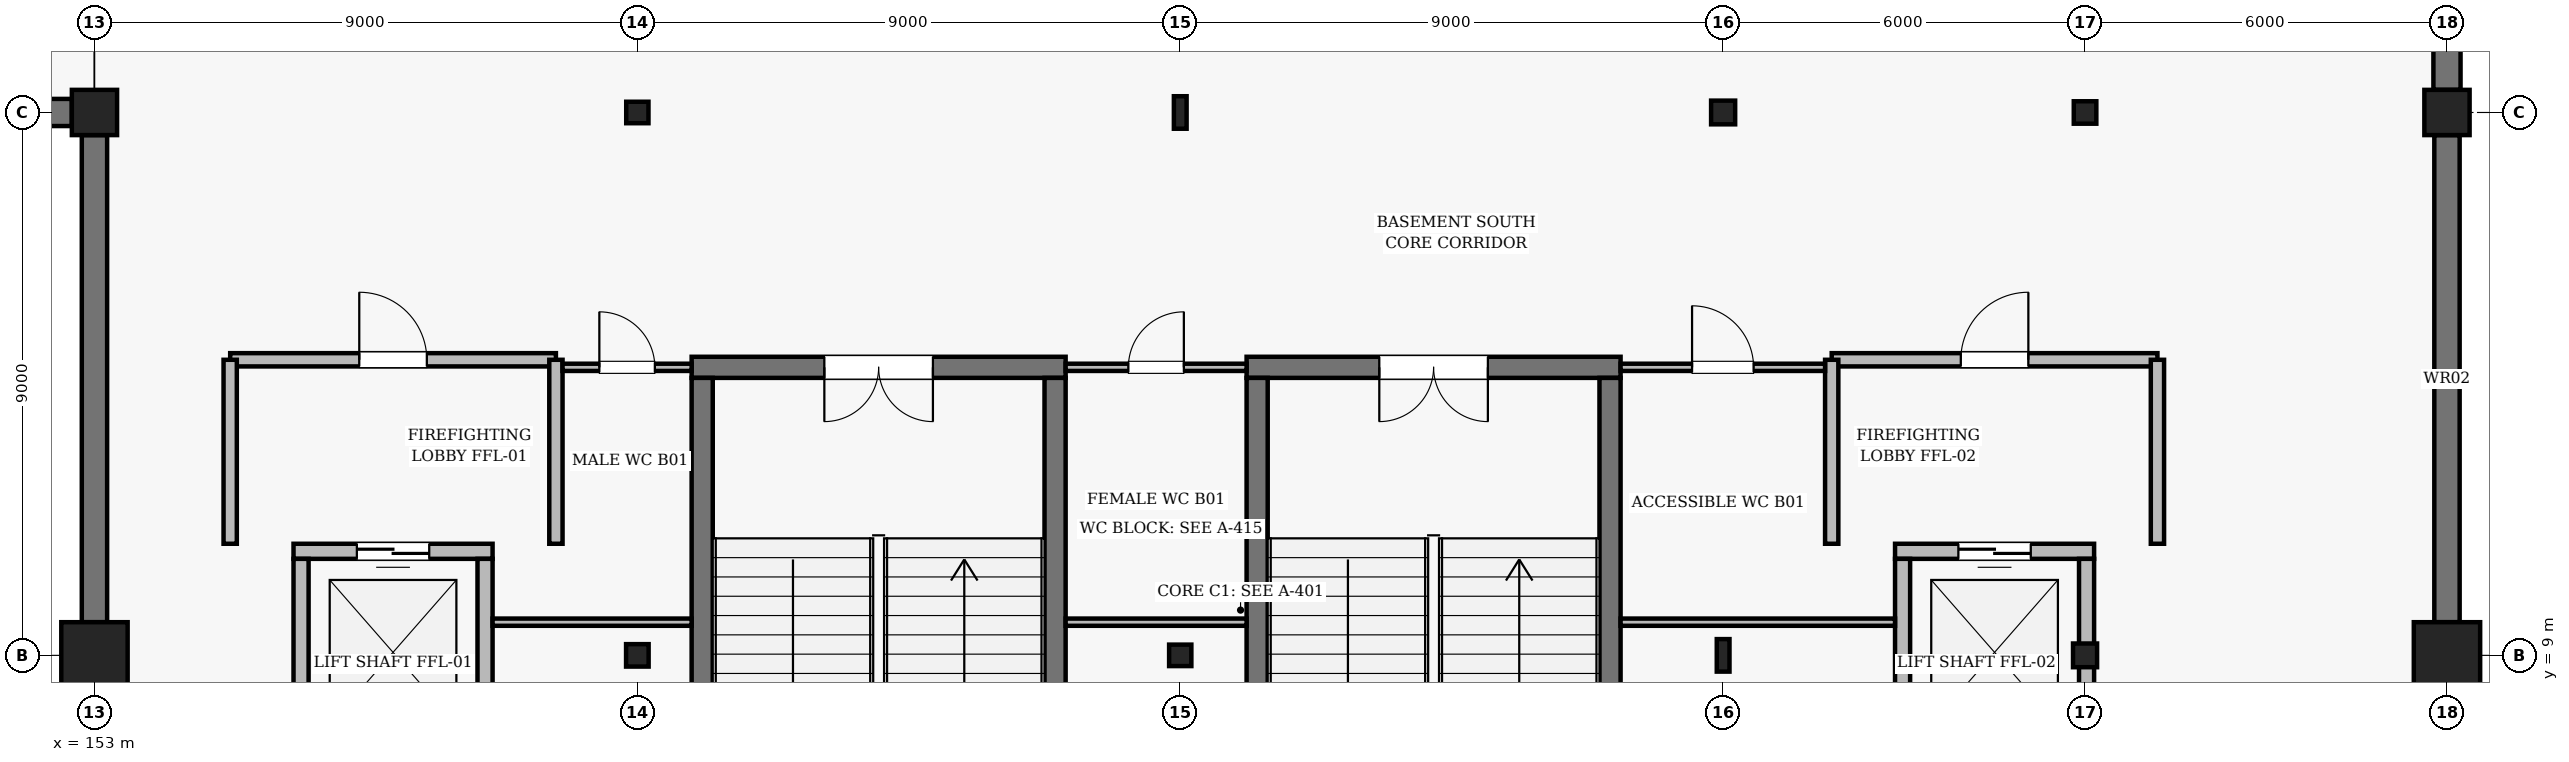
"""IFC4 building model, lengths in metres.
Left out: names, types, materials, properties, quantities, classifications, styles, units other than length and angle.
Written with IfcOpenShell. Run it as: python <this file> out.ifc"""

import sys

from ifc_helpers import new_model, si_unit, direction, frame, frame_2d, origin, origin_2d, place, context, subcontext, project, spatial, rectangle, i_section, extrude, element, fill, save


model = new_model("IFC4")
c1 = context("Model", 3, precision=1e-05, world=origin(), true_north=direction((0.0, 1.0)))
c2 = subcontext(c1, "Body", "Model", "MODEL_VIEW")
j1 = project(units=[si_unit("LENGTHUNIT", "METRE"), si_unit("PLANEANGLEUNIT", "RADIAN")], contexts=[c1])
p1 = place(None, origin())
s1 = spatial("IfcSite", under=j1, at=p1, CompositionType="ELEMENT")
p2 = place(p1, origin())
s2 = spatial("IfcBuilding", under=s1, at=p2, CompositionType="ELEMENT")
p3 = place(p2, frame((0.0, 0.0, -5.4)))
s3 = spatial("IfcBuildingStorey", under=s2, at=p3, CompositionType="ELEMENT", Elevation=-5.4)
p4 = place(p3, frame((153.0, 9.0, 0.0), z_axis=(0.0, 0.0, 1.0), x_axis=(1.0, 0.0, 0.0)))
e1 = element("IfcColumn", 1, at=p4, inside=s3, PredefinedType="COLUMN", context=c2, shape_type="SweptSolid", body=[
    extrude(rectangle(XDim=1.1, YDim=1.1, at=origin_2d()), origin(), (0.0, 0.0, 1.0), 5.4),
])
p5 = place(p3, frame((153.0, 18.0, 0.0), z_axis=(0.0, 0.0, 1.0), x_axis=(1.0, 0.0, 0.0)))
e2 = element("IfcColumn", 2, at=p5, inside=s3, PredefinedType="COLUMN", context=c2, shape_type="SweptSolid", body=[
    extrude(rectangle(XDim=0.75, YDim=0.75, at=origin_2d()), origin(), (0.0, 0.0, 1.0), 5.4),
])
p6 = place(p3, frame((162.0, 9.0, 0.0), z_axis=(0.0, 0.0, 1.0), x_axis=(1.0, 0.0, 0.0)))
e3 = element("IfcColumn", 3, at=p6, inside=s3, PredefinedType="COLUMN", context=c2, shape_type="SweptSolid", body=[
    extrude(i_section(OverallWidth=0.374, OverallDepth=0.372, WebThickness=0.016, FlangeThickness=0.026, FilletRadius=0.016, at=origin_2d()), origin(), (0.0, 0.0, 1.0), 5.4),
])
for number, where, z_axis, x_axis in (
    (4, (162.0, 18.0, 0.0), (0.0, 0.0, 1.0), (1.0, 0.0, 0.0)),
    (5, (171.0, 9.0, 0.0), (0.0, 0.0, 1.0), (1.0, 0.0, 0.0)),
):
    element("IfcColumn", number, at=place(p3, frame(where, z_axis=z_axis, x_axis=x_axis)), inside=s3, PredefinedType="COLUMN", context=c2, shape_type="SweptSolid", body=[
        extrude(i_section(OverallWidth=0.369, OverallDepth=0.356, WebThickness=0.011, FlangeThickness=0.018, FilletRadius=0.015, at=origin_2d()), origin(), (0.0, 0.0, 1.0), 5.4),
    ])
for number, where, z_axis, x_axis in (
    (6, (171.0, 18.0, 0.0), (0.0, 0.0, 1.0), (1.0, 0.0, 0.0)),
    (7, (180.0, 9.0, 0.0), (0.0, 0.0, 1.0), (1.0, 0.0, 0.0)),
):
    element("IfcColumn", number, at=place(p3, frame(where, z_axis=z_axis, x_axis=x_axis)), inside=s3, PredefinedType="COLUMN", context=c2, shape_type="SweptSolid", body=[
        extrude(i_section(OverallWidth=0.211, OverallDepth=0.539, WebThickness=0.012, FlangeThickness=0.019, FilletRadius=0.014, at=origin_2d()), origin(), (0.0, 0.0, 1.0), 5.4),
    ])
for number, where, z_axis, x_axis in (
    (8, (180.0, 18.0, 0.0), (0.0, 0.0, 1.0), (1.0, 0.0, 0.0)),
    (9, (186.0, 9.0, 0.0), (0.0, 0.0, 1.0), (1.0, 0.0, 0.0)),
):
    element("IfcColumn", number, at=place(p3, frame(where, z_axis=z_axis, x_axis=x_axis)), inside=s3, PredefinedType="COLUMN", context=c2, shape_type="SweptSolid", body=[
        extrude(i_section(OverallWidth=0.399, OverallDepth=0.393, WebThickness=0.023, FlangeThickness=0.037, FilletRadius=0.018, at=origin_2d()), origin(), (0.0, 0.0, 1.0), 5.4),
    ])
p7 = place(p3, frame((186.0, 18.0, 0.0), z_axis=(0.0, 0.0, 1.0), x_axis=(1.0, 0.0, 0.0)))
e10 = element("IfcColumn", 10, at=p7, inside=s3, PredefinedType="COLUMN", context=c2, shape_type="SweptSolid", body=[
    extrude(i_section(OverallWidth=0.374, OverallDepth=0.372, WebThickness=0.016, FlangeThickness=0.026, FilletRadius=0.016, at=origin_2d()), origin(), (0.0, 0.0, 1.0), 5.4),
])
p8 = place(p3, frame((192.0, 9.0, 0.0), z_axis=(0.0, 0.0, 1.0), x_axis=(1.0, 0.0, 0.0)))
e11 = element("IfcColumn", 11, at=p8, inside=s3, PredefinedType="COLUMN", context=c2, shape_type="SweptSolid", body=[
    extrude(rectangle(XDim=1.1, YDim=1.1, at=origin_2d()), origin(), (0.0, 0.0, 1.0), 5.4),
])
p9 = place(p3, frame((192.0, 18.0, 0.0), z_axis=(0.0, 0.0, 1.0), x_axis=(1.0, 0.0, 0.0)))
e12 = element("IfcColumn", 12, at=p9, inside=s3, PredefinedType="COLUMN", context=c2, shape_type="SweptSolid", body=[
    extrude(rectangle(XDim=0.75, YDim=0.75, at=origin_2d()), origin(), (0.0, 0.0, 1.0), 5.4),
])
p10 = place(p3, frame((192.0, 26.625, 0.0), z_axis=(0.0, 0.0, 1.0), x_axis=(0.0, -1.0, 0.0)))
e13 = element("IfcWall", 13, at=p10, inside=s3, PredefinedType="USERDEFINED", context=c2, shape_type="SweptSolid", body=[
    extrude(rectangle(XDim=8.25, YDim=0.45, at=frame_2d((4.125, 0.0))), origin(), (0.0, 0.0, 1.0), 4.805),
])
p11 = place(p3, frame((192.0, 17.625, 0.0), z_axis=(0.0, 0.0, 1.0), x_axis=(0.0, -1.0, 0.0)))
e14 = element("IfcWall", 14, at=p11, inside=s3, PredefinedType="USERDEFINED", context=c2, shape_type="SweptSolid", body=[
    extrude(rectangle(XDim=8.075, YDim=0.42, at=frame_2d((4.038, 0.0))), origin(), (0.0, 0.0, 1.0), 4.639),
])
p12 = place(p3, frame((153.0, 9.55, 0.0), z_axis=(0.0, 0.0, 1.0), x_axis=(0.0, 1.0, 0.0)))
e15 = element("IfcWall", 15, at=p12, inside=s3, PredefinedType="USERDEFINED", context=c2, shape_type="SweptSolid", body=[
    extrude(rectangle(XDim=8.075, YDim=0.42, at=frame_2d((4.038, 0.0))), origin(), (0.0, 0.0, 1.0), 4.421),
])
p13 = place(p3, frame((152.625, 18.0, 0.0), z_axis=(0.0, 0.0, 1.0), x_axis=(-1.0, 0.0, 0.0)))
e16 = element("IfcWall", 16, at=p13, inside=s3, PredefinedType="USERDEFINED", context=c2, shape_type="SweptSolid", body=[
    extrude(rectangle(XDim=8.25, YDim=0.45, at=frame_2d((4.125, 0.0))), origin(), (0.0, 0.0, 1.0), 5.05),
])
p14 = place(p3, frame((169.1, 13.775, 0.0), z_axis=(0.0, 0.0, 1.0), x_axis=(-1.0, 0.0, 0.0)))
e17 = element("IfcWall", 17, at=p14, inside=s3, PredefinedType="SHEAR", context=c2, shape_type="SweptSolid", body=[
    extrude(rectangle(XDim=6.2, YDim=0.35, at=frame_2d((3.1, 0.0))), origin(), (0.0, 0.0, 1.0), 5.12),
])
p15 = place(p14, frame((2.2, 0.0, 0.0)))
e18 = element("IfcOpeningElement", 18, at=p15, cuts=e17, PredefinedType="OPENING", context=c2, shape_type="SweptSolid", body=[
    extrude(rectangle(XDim=1.8, YDim=2.2, at=frame_2d((0.9, 1.1))), frame((0.0, 0.185, 0.0), z_axis=(0.0, -1.0, 0.0), x_axis=(1.0, 0.0, 0.0)), (0.0, 0.0, 1.0), 0.37),
])
for number, where, z_axis, x_axis in (
    (19, (163.075, 13.6, 0.0), (0.0, 0.0, 1.0), (0.0, -1.0, 0.0)),
    (20, (168.925, 2.2, 0.0), (0.0, 0.0, 1.0), (0.0, 1.0, 0.0)),
):
    element("IfcWall", number, at=place(p3, frame(where, z_axis=z_axis, x_axis=x_axis)), inside=s3, PredefinedType="SHEAR", context=c2, shape_type="SweptSolid", body=[
        extrude(rectangle(XDim=11.4, YDim=0.35, at=frame_2d((5.7, 0.0))), origin(), (0.0, 0.0, 1.0), 5.12),
    ])
p16 = place(p3, frame((178.3, 13.775, 0.0), z_axis=(0.0, 0.0, 1.0), x_axis=(-1.0, 0.0, 0.0)))
e21 = element("IfcWall", 21, at=p16, inside=s3, PredefinedType="SHEAR", context=c2, shape_type="SweptSolid", body=[
    extrude(rectangle(XDim=6.2, YDim=0.35, at=frame_2d((3.1, 0.0))), origin(), (0.0, 0.0, 1.0), 5.12),
])
p17 = place(p16, frame((2.2, 0.0, 0.0)))
e22 = element("IfcOpeningElement", 22, at=p17, cuts=e21, PredefinedType="OPENING", context=c2, shape_type="SweptSolid", body=[
    extrude(rectangle(XDim=1.8, YDim=2.2, at=frame_2d((0.9, 1.1))), frame((0.0, 0.185, 0.0), z_axis=(0.0, -1.0, 0.0), x_axis=(1.0, 0.0, 0.0)), (0.0, 0.0, 1.0), 0.37),
])
for number, where, z_axis, x_axis in (
    (23, (172.275, 13.6, 0.0), (0.0, 0.0, 1.0), (0.0, -1.0, 0.0)),
    (24, (178.125, 2.2, 0.0), (0.0, 0.0, 1.0), (0.0, 1.0, 0.0)),
):
    element("IfcWall", number, at=place(p3, frame(where, z_axis=z_axis, x_axis=x_axis)), inside=s3, PredefinedType="SHEAR", context=c2, shape_type="SweptSolid", body=[
        extrude(rectangle(XDim=11.4, YDim=0.35, at=frame_2d((5.7, 0.0))), origin(), (0.0, 0.0, 1.0), 5.12),
    ])
p18 = place(p3, frame((159.6, 10.725, 0.0), z_axis=(0.0, 0.0, 1.0), x_axis=(-1.0, 0.0, 0.0)))
e25 = element("IfcWall", 25, at=p18, inside=s3, PredefinedType="SOLIDWALL", context=c2, shape_type="SweptSolid", body=[
    extrude(rectangle(XDim=3.3, YDim=0.25, at=frame_2d((1.65, 0.0))), origin(), (0.0, 0.0, 1.0), 5.1),
])
p19 = place(p18, frame((1.05, 0.0, 0.0)))
e26 = element("IfcOpeningElement", 26, at=p19, cuts=e25, PredefinedType="OPENING", context=c2, shape_type="SweptSolid", body=[
    extrude(rectangle(XDim=1.2, YDim=2.25, at=frame_2d((0.6, 1.125))), frame((0.0, 0.135, 0.0), z_axis=(0.0, -1.0, 0.0), x_axis=(1.0, 0.0, 0.0)), (0.0, 0.0, 1.0), 0.27),
])
for number, where, z_axis, x_axis in (
    (27, (156.425, 10.6, 0.0), (0.0, 0.0, 1.0), (0.0, -1.0, 0.0)),
    (28, (159.475, 7.5, 0.0), (0.0, 0.0, 1.0), (0.0, 1.0, 0.0)),
):
    element("IfcWall", number, at=place(p3, frame(where, z_axis=z_axis, x_axis=x_axis)), inside=s3, PredefinedType="SOLIDWALL", context=c2, shape_type="SweptSolid", body=[
        extrude(rectangle(XDim=3.1, YDim=0.25, at=frame_2d((1.55, 0.0))), origin(), (0.0, 0.0, 1.0), 5.1),
    ])
p20 = place(p3, frame((155.25, 13.9, 0.0), z_axis=(0.0, 0.0, 1.0), x_axis=(1.0, 0.0, 0.0)))
e29 = element("IfcWall", 29, at=p20, inside=s3, PredefinedType="SOLIDWALL", context=c2, shape_type="SweptSolid", body=[
    extrude(rectangle(XDim=5.4, YDim=0.22, at=frame_2d((2.7, 0.0))), origin(), (0.0, 0.0, 1.0), 5.1),
])
p21 = place(p20, frame((2.14, 0.0, 0.0)))
e30 = element("IfcOpeningElement", 30, at=p21, cuts=e29, PredefinedType="OPENING", context=c2, shape_type="SweptSolid", body=[
    extrude(rectangle(XDim=1.12, YDim=2.2, at=frame_2d((0.56, 1.1))), frame((0.0, 0.12, 0.0), z_axis=(0.0, -1.0, 0.0), x_axis=(1.0, 0.0, 0.0)), (0.0, 0.0, 1.0), 0.24),
])
for number, where, z_axis, x_axis in (
    (31, (155.25, 10.85, 0.0), (0.0, 0.0, 1.0), (0.0, 1.0, 0.0)),
    (32, (160.65, 10.85, 0.0), (0.0, 0.0, 1.0), (0.0, 1.0, 0.0)),
):
    element("IfcWall", number, at=place(p3, frame(where, z_axis=z_axis, x_axis=x_axis)), inside=s3, PredefinedType="SOLIDWALL", context=c2, shape_type="SweptSolid", body=[
        extrude(rectangle(XDim=3.05, YDim=0.22, at=frame_2d((1.525, 0.0))), origin(), (0.0, 0.0, 1.0), 5.1),
    ])
p22 = place(p3, frame((186.15, 10.725, 0.0), z_axis=(0.0, 0.0, 1.0), x_axis=(-1.0, 0.0, 0.0)))
e33 = element("IfcWall", 33, at=p22, inside=s3, PredefinedType="SOLIDWALL", context=c2, shape_type="SweptSolid", body=[
    extrude(rectangle(XDim=3.3, YDim=0.25, at=frame_2d((1.65, 0.0))), origin(), (0.0, 0.0, 1.0), 5.1),
])
p23 = place(p22, frame((1.05, 0.0, 0.0)))
e34 = element("IfcOpeningElement", 34, at=p23, cuts=e33, PredefinedType="OPENING", context=c2, shape_type="SweptSolid", body=[
    extrude(rectangle(XDim=1.2, YDim=2.25, at=frame_2d((0.6, 1.125))), frame((0.0, 0.135, 0.0), z_axis=(0.0, -1.0, 0.0), x_axis=(1.0, 0.0, 0.0)), (0.0, 0.0, 1.0), 0.27),
])
for number, where, z_axis, x_axis in (
    (35, (182.975, 10.6, 0.0), (0.0, 0.0, 1.0), (0.0, -1.0, 0.0)),
    (36, (186.025, 7.5, 0.0), (0.0, 0.0, 1.0), (0.0, 1.0, 0.0)),
):
    element("IfcWall", number, at=place(p3, frame(where, z_axis=z_axis, x_axis=x_axis)), inside=s3, PredefinedType="SOLIDWALL", context=c2, shape_type="SweptSolid", body=[
        extrude(rectangle(XDim=3.1, YDim=0.25, at=frame_2d((1.55, 0.0))), origin(), (0.0, 0.0, 1.0), 5.1),
    ])
p24 = place(p3, frame((181.8, 13.9, 0.0), z_axis=(0.0, 0.0, 1.0), x_axis=(1.0, 0.0, 0.0)))
e37 = element("IfcWall", 37, at=p24, inside=s3, PredefinedType="SOLIDWALL", context=c2, shape_type="SweptSolid", body=[
    extrude(rectangle(XDim=5.4, YDim=0.22, at=frame_2d((2.7, 0.0))), origin(), (0.0, 0.0, 1.0), 5.1),
])
p25 = place(p24, frame((2.14, 0.0, 0.0)))
e38 = element("IfcOpeningElement", 38, at=p25, cuts=e37, PredefinedType="OPENING", context=c2, shape_type="SweptSolid", body=[
    extrude(rectangle(XDim=1.12, YDim=2.2, at=frame_2d((0.56, 1.1))), frame((0.0, 0.12, 0.0), z_axis=(0.0, -1.0, 0.0), x_axis=(1.0, 0.0, 0.0)), (0.0, 0.0, 1.0), 0.24),
])
for number, where, z_axis, x_axis in (
    (39, (181.8, 10.85, 0.0), (0.0, 0.0, 1.0), (0.0, 1.0, 0.0)),
    (40, (187.2, 10.85, 0.0), (0.0, 0.0, 1.0), (0.0, 1.0, 0.0)),
):
    element("IfcWall", number, at=place(p3, frame(where, z_axis=z_axis, x_axis=x_axis)), inside=s3, PredefinedType="SOLIDWALL", context=c2, shape_type="SweptSolid", body=[
        extrude(rectangle(XDim=3.05, YDim=0.22, at=frame_2d((1.525, 0.0))), origin(), (0.0, 0.0, 1.0), 5.1),
    ])
p26 = place(p3, frame((160.76, 13.775, 0.0), z_axis=(0.0, 0.0, 1.0), x_axis=(1.0, 0.0, 0.0)))
e41 = element("IfcWall", 41, at=p26, inside=s3, PredefinedType="PARTITIONING", context=c2, shape_type="SweptSolid", body=[
    extrude(rectangle(XDim=2.14, YDim=0.12, at=frame_2d((1.07, 0.0))), origin(), (0.0, 0.0, 1.0), 4.332),
])
p27 = place(p26, frame((0.61, 0.0, 0.0)))
e42 = element("IfcOpeningElement", 42, at=p27, cuts=e41, PredefinedType="OPENING", context=c2, shape_type="SweptSolid", body=[
    extrude(rectangle(XDim=0.92, YDim=2.12, at=frame_2d((0.46, 1.06))), frame((0.0, 0.07, 0.0), z_axis=(0.0, -1.0, 0.0), x_axis=(1.0, 0.0, 0.0)), (0.0, 0.0, 1.0), 0.14),
])
p28 = place(p3, frame((162.9, 9.55, 0.0), z_axis=(0.0, 0.0, 1.0), x_axis=(-1.0, 0.0, 0.0)))
e43 = element("IfcWall", 43, at=p28, inside=s3, PredefinedType="PARTITIONING", context=c2, shape_type="SweptSolid", body=[
    extrude(rectangle(XDim=3.3, YDim=0.12, at=frame_2d((1.65, 0.0))), origin(), (0.0, 0.0, 1.0), 4.332),
])
p29 = place(p3, frame((169.1, 13.775, 0.0), z_axis=(0.0, 0.0, 1.0), x_axis=(1.0, 0.0, 0.0)))
e44 = element("IfcWall", 44, at=p29, inside=s3, PredefinedType="PARTITIONING", context=c2, shape_type="SweptSolid", body=[
    extrude(rectangle(XDim=3.0, YDim=0.12, at=frame_2d((1.5, 0.0))), origin(), (0.0, 0.0, 1.0), 4.332),
])
p30 = place(p29, frame((1.04, 0.0, 0.0)))
e45 = element("IfcOpeningElement", 45, at=p30, cuts=e44, PredefinedType="OPENING", context=c2, shape_type="SweptSolid", body=[
    extrude(rectangle(XDim=0.92, YDim=2.12, at=frame_2d((0.46, 1.06))), frame((0.0, 0.07, 0.0), z_axis=(0.0, -1.0, 0.0), x_axis=(1.0, 0.0, 0.0)), (0.0, 0.0, 1.0), 0.14),
])
p31 = place(p3, frame((172.1, 9.55, 0.0), z_axis=(0.0, 0.0, 1.0), x_axis=(-1.0, 0.0, 0.0)))
e46 = element("IfcWall", 46, at=p31, inside=s3, PredefinedType="PARTITIONING", context=c2, shape_type="SweptSolid", body=[
    extrude(rectangle(XDim=3.0, YDim=0.12, at=frame_2d((1.5, 0.0))), origin(), (0.0, 0.0, 1.0), 4.332),
])
p32 = place(p3, frame((178.3, 13.775, 0.0), z_axis=(0.0, 0.0, 1.0), x_axis=(1.0, 0.0, 0.0)))
e47 = element("IfcWall", 47, at=p32, inside=s3, PredefinedType="PARTITIONING", context=c2, shape_type="SweptSolid", body=[
    extrude(rectangle(XDim=3.39, YDim=0.12, at=frame_2d((1.695, 0.0))), origin(), (0.0, 0.0, 1.0), 4.332),
])
p33 = place(p32, frame((1.185, 0.0, 0.0)))
e48 = element("IfcOpeningElement", 48, at=p33, cuts=e47, PredefinedType="OPENING", context=c2, shape_type="SweptSolid", body=[
    extrude(rectangle(XDim=1.02, YDim=2.16, at=frame_2d((0.51, 1.08))), frame((0.0, 0.07, 0.0), z_axis=(0.0, -1.0, 0.0), x_axis=(1.0, 0.0, 0.0)), (0.0, 0.0, 1.0), 0.14),
])
p34 = place(p3, frame((182.85, 9.55, 0.0), z_axis=(0.0, 0.0, 1.0), x_axis=(-1.0, 0.0, 0.0)))
e49 = element("IfcWall", 49, at=p34, inside=s3, PredefinedType="PARTITIONING", context=c2, shape_type="SweptSolid", body=[
    extrude(rectangle(XDim=4.55, YDim=0.12, at=frame_2d((2.275, 0.0))), origin(), (0.0, 0.0, 1.0), 4.332),
])
p35 = place(p15, origin())
e50 = element("IfcDoor", 50, at=p35, inside=s3, OperationType="DOUBLE_DOOR_SINGLE_SWING", PredefinedType="DOOR", context=c2, shape_type="SweptSolid", body=[
    extrude(rectangle(XDim=1.8, YDim=2.2, at=frame_2d((0.9, 1.1))), frame((0.0, 0.025, 0.0), z_axis=(0.0, -1.0, 0.0), x_axis=(1.0, 0.0, 0.0)), (0.0, 0.0, 1.0), 0.05),
])
fill(e18, e50)
p36 = place(p17, origin())
e51 = element("IfcDoor", 51, at=p36, inside=s3, OperationType="DOUBLE_DOOR_SINGLE_SWING", PredefinedType="DOOR", context=c2, shape_type="SweptSolid", body=[
    extrude(rectangle(XDim=1.8, YDim=2.2, at=frame_2d((0.9, 1.1))), frame((0.0, 0.025, 0.0), z_axis=(0.0, -1.0, 0.0), x_axis=(1.0, 0.0, 0.0)), (0.0, 0.0, 1.0), 0.05),
])
fill(e22, e51)
p37 = place(p19, origin())
e52 = element("IfcDoor", 52, at=p37, inside=s3, OperationType="DOUBLE_DOOR_SLIDING", PredefinedType="DOOR", context=c2, shape_type="SweptSolid", body=[
    extrude(rectangle(XDim=1.2, YDim=2.25, at=frame_2d((0.6, 1.125))), frame((0.0, 0.025, 0.0), z_axis=(0.0, -1.0, 0.0), x_axis=(1.0, 0.0, 0.0)), (0.0, 0.0, 1.0), 0.05),
])
fill(e26, e52)
p38 = place(p21, origin())
e53 = element("IfcDoor", 53, at=p38, inside=s3, OperationType="SINGLE_SWING_LEFT", PredefinedType="DOOR", context=c2, shape_type="SweptSolid", body=[
    extrude(rectangle(XDim=1.12, YDim=2.2, at=frame_2d((0.56, 1.1))), frame((0.0, 0.025, 0.0), z_axis=(0.0, -1.0, 0.0), x_axis=(1.0, 0.0, 0.0)), (0.0, 0.0, 1.0), 0.05),
])
fill(e30, e53)
p39 = place(p23, origin())
e54 = element("IfcDoor", 54, at=p39, inside=s3, OperationType="DOUBLE_DOOR_SLIDING", PredefinedType="DOOR", context=c2, shape_type="SweptSolid", body=[
    extrude(rectangle(XDim=1.2, YDim=2.25, at=frame_2d((0.6, 1.125))), frame((0.0, 0.025, 0.0), z_axis=(0.0, -1.0, 0.0), x_axis=(1.0, 0.0, 0.0)), (0.0, 0.0, 1.0), 0.05),
])
fill(e34, e54)
p40 = place(p25, origin())
e55 = element("IfcDoor", 55, at=p40, inside=s3, OperationType="SINGLE_SWING_RIGHT", PredefinedType="DOOR", context=c2, shape_type="SweptSolid", body=[
    extrude(rectangle(XDim=1.12, YDim=2.2, at=frame_2d((0.56, 1.1))), frame((0.0, 0.025, 0.0), z_axis=(0.0, -1.0, 0.0), x_axis=(1.0, 0.0, 0.0)), (0.0, 0.0, 1.0), 0.05),
])
fill(e38, e55)
p41 = place(p27, origin())
e56 = element("IfcDoor", 56, at=p41, inside=s3, OperationType="SINGLE_SWING_LEFT", PredefinedType="DOOR", context=c2, shape_type="SweptSolid", body=[
    extrude(rectangle(XDim=0.92, YDim=2.12, at=frame_2d((0.46, 1.06))), frame((0.0, 0.025, 0.0), z_axis=(0.0, -1.0, 0.0), x_axis=(1.0, 0.0, 0.0)), (0.0, 0.0, 1.0), 0.05),
])
fill(e42, e56)
p42 = place(p30, origin())
e57 = element("IfcDoor", 57, at=p42, inside=s3, OperationType="SINGLE_SWING_RIGHT", PredefinedType="DOOR", context=c2, shape_type="SweptSolid", body=[
    extrude(rectangle(XDim=0.92, YDim=2.12, at=frame_2d((0.46, 1.06))), frame((0.0, 0.025, 0.0), z_axis=(0.0, -1.0, 0.0), x_axis=(1.0, 0.0, 0.0)), (0.0, 0.0, 1.0), 0.05),
])
fill(e45, e57)
p43 = place(p33, origin())
e58 = element("IfcDoor", 58, at=p43, inside=s3, OperationType="SINGLE_SWING_LEFT", PredefinedType="DOOR", context=c2, shape_type="SweptSolid", body=[
    extrude(rectangle(XDim=1.02, YDim=2.16, at=frame_2d((0.51, 1.08))), frame((0.0, 0.025, 0.0), z_axis=(0.0, -1.0, 0.0), x_axis=(1.0, 0.0, 0.0)), (0.0, 0.0, 1.0), 0.05),
])
fill(e48, e58)
save(model, sys.argv[1])
